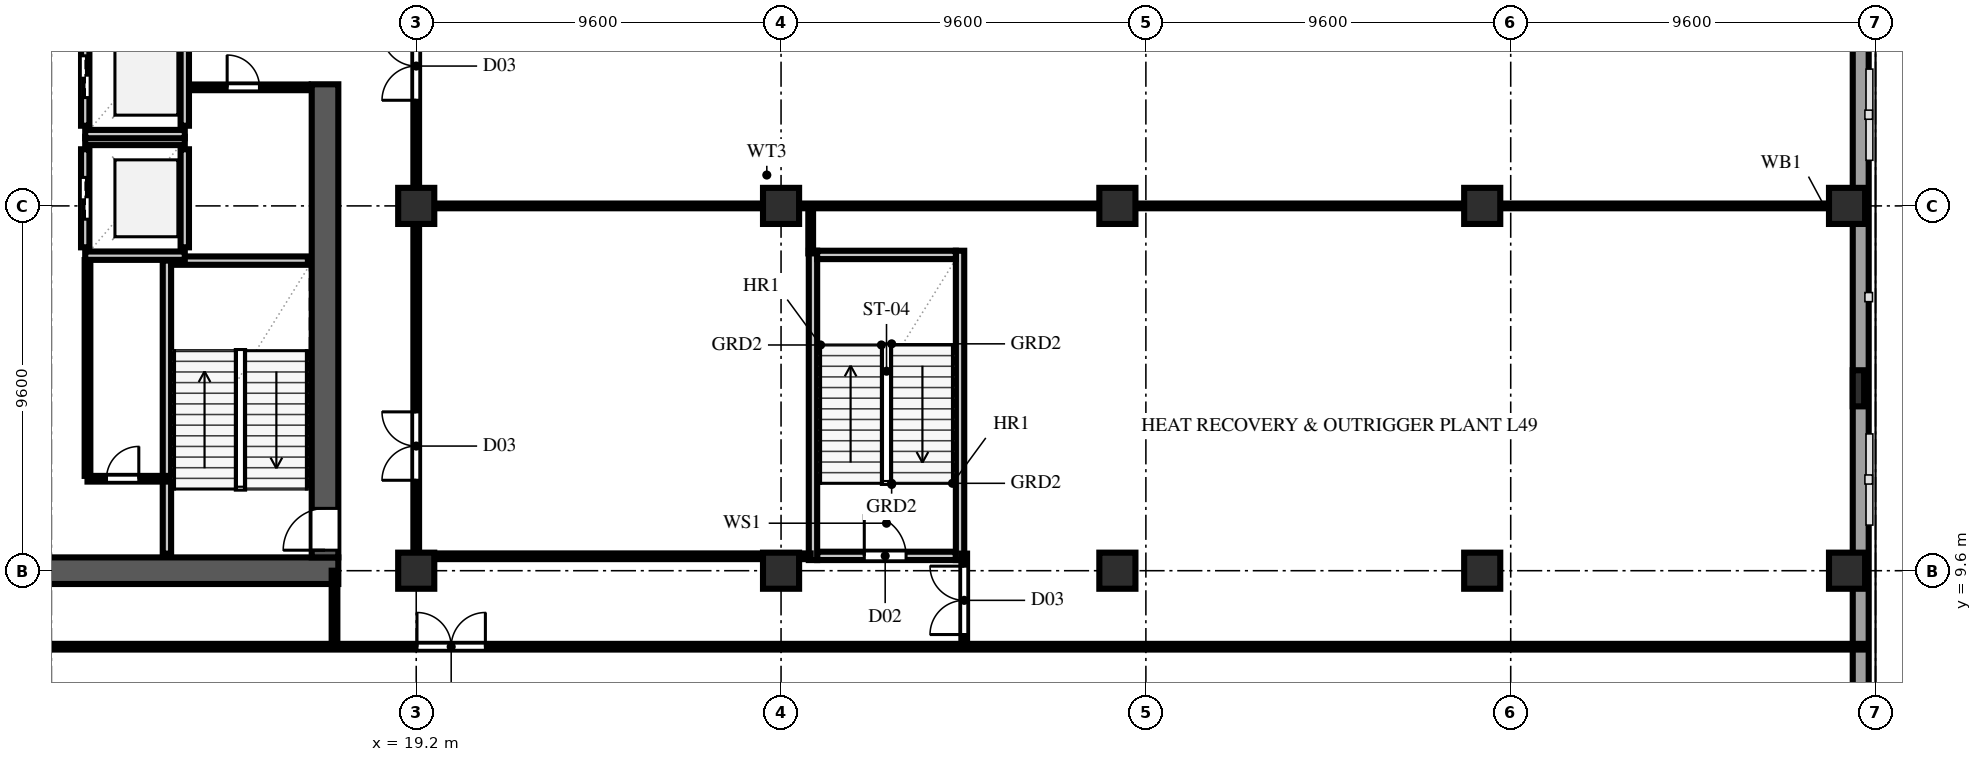
"""IFC4 building model, lengths in metres.
Left out: names, types, materials, properties, quantities, classifications, styles, units other than length and angle.
Written with IfcOpenShell. Run it as: python <this file> out.ifc"""

import sys

from ifc_helpers import new_model, si_unit, direction, frame, frame_2d, origin, origin_2d, place, context, subcontext, project, spatial, rectangle, extrude, element, fill, save


model = new_model("IFC4")
c1 = context("Model", 3, precision=1e-05, world=origin(), true_north=direction((0.0, 1.0)))
c2 = subcontext(c1, "Body", "Model", "MODEL_VIEW")
j1 = project(units=[si_unit("LENGTHUNIT", "METRE"), si_unit("PLANEANGLEUNIT", "RADIAN")], contexts=[c1])
p1 = place(None, origin())
s1 = spatial("IfcSite", under=j1, at=p1, CompositionType="ELEMENT")
p2 = place(p1, origin())
s2 = spatial("IfcBuilding", under=s1, at=p2, CompositionType="ELEMENT")
p3 = place(p2, frame((0.0, 0.0, 194.0)))
s3 = spatial("IfcBuildingStorey", under=s2, at=p3, CompositionType="ELEMENT", Elevation=194.0)
p4 = place(p3, frame((2.55, 9.6, 0.0), z_axis=(0.0, 0.0, 1.0), x_axis=(1.0, 0.0, 0.0)))
e1 = element("IfcWall", 1, at=p4, inside=s3, PredefinedType="SHEAR", context=c2, shape_type="SweptSolid", body=[
    extrude(rectangle(XDim=14.6, YDim=0.7, at=frame_2d((7.3, 0.0))), origin(), (0.0, 0.0, 1.0), 4.74),
])
p5 = place(p3, frame((16.8, 9.95, 0.0), z_axis=(0.0, 0.0, 1.0), x_axis=(0.0, 1.0, 0.0)))
e2 = element("IfcWall", 2, at=p5, inside=s3, PredefinedType="SHEAR", context=c2, shape_type="SweptSolid", body=[
    extrude(rectangle(XDim=12.45, YDim=0.7, at=frame_2d((6.225, 0.0))), origin(), (0.0, 0.0, 1.0), 4.74),
])
p6 = place(p5, frame((0.19, 0.0, 0.0)))
e3 = element("IfcOpeningElement", 3, at=p6, cuts=e2, PredefinedType="OPENING", context=c2, shape_type="SweptSolid", body=[
    extrude(rectangle(XDim=1.1, YDim=2.2, at=frame_2d((0.55, 1.1))), frame((0.0, 0.362, 0.0), z_axis=(0.0, -1.0, 0.0), x_axis=(1.0, 0.0, 0.0)), (0.0, 0.0, 1.0), 0.724),
])
for number, where, z_axis, x_axis in (
    (4, (19.2, 9.6, 0.0), (0.0, 0.0, 1.0), (1.0, 0.0, 0.0)),
    (5, (19.2, 19.2, 0.0), (0.0, 0.0, 1.0), (1.0, 0.0, 0.0)),
    (6, (28.8, 9.6, 0.0), (0.0, 0.0, 1.0), (1.0, 0.0, 0.0)),
    (7, (28.8, 19.2, 0.0), (0.0, 0.0, 1.0), (1.0, 0.0, 0.0)),
    (8, (37.65, 9.6, 0.0), (0.0, 0.0, 1.0), (1.0, 0.0, 0.0)),
    (9, (37.65, 19.2, 0.0), (0.0, 0.0, 1.0), (1.0, 0.0, 0.0)),
    (10, (47.25, 9.6, 0.0), (0.0, 0.0, 1.0), (1.0, 0.0, 0.0)),
    (11, (47.25, 19.2, 0.0), (0.0, 0.0, 1.0), (1.0, 0.0, 0.0)),
    (12, (56.85, 9.6, 0.0), (0.0, 0.0, 1.0), (1.0, 0.0, 0.0)),
    (13, (56.85, 19.2, 0.0), (0.0, 0.0, 1.0), (1.0, 0.0, 0.0)),
):
    element("IfcColumn", number, at=place(p3, frame(where, z_axis=z_axis, x_axis=x_axis)), inside=s3, PredefinedType="COLUMN", context=c2, shape_type="SweptSolid", body=[
        extrude(rectangle(XDim=0.95, YDim=0.95, at=origin_2d()), origin(), (0.0, 0.0, 1.0), 5.0),
    ])
p7 = place(p3, frame((57.15, 14.4, 0.0), z_axis=(0.0, 0.0, 1.0), x_axis=(0.0, 1.0, 0.0)))
e14 = element("IfcColumn", 14, at=p7, inside=s3, PredefinedType="PILASTER", context=c2, shape_type="SweptSolid", body=[
    extrude(rectangle(XDim=0.95, YDim=0.3, at=origin_2d()), origin(), (0.0, 0.0, 1.0), 5.0),
])
p8 = place(p3, frame((57.21, 1.84, 0.0), z_axis=(0.0, 0.0, 1.0), x_axis=(0.0, 1.0, 0.0)))
e15 = element("IfcWall", 15, at=p8, inside=s3, PredefinedType="SOLIDWALL", context=c2, shape_type="SweptSolid", body=[
    extrude(rectangle(XDim=34.72, YDim=0.42, at=frame_2d((17.36, 0.0))), origin(), (0.0, 0.0, 1.0), 4.74),
])
p9 = place(p3, frame((12.64, 10.05, 0.0), z_axis=(0.0, 0.0, 1.0), x_axis=(0.0, 1.0, 0.0)))
e16 = element("IfcWall", 16, at=p9, inside=s3, PredefinedType="SOLIDWALL", context=c2, shape_type="SweptSolid", body=[
    extrude(rectangle(XDim=7.71, YDim=0.22, at=frame_2d((3.855, 0.0))), origin(), (0.0, 0.0, 1.0), 4.74),
])
p10 = place(p3, frame((12.75, 17.76, 0.0), z_axis=(0.0, 0.0, 1.0), x_axis=(1.0, 0.0, 0.0)))
e17 = element("IfcWall", 17, at=p10, inside=s3, PredefinedType="SOLIDWALL", context=c2, shape_type="SweptSolid", body=[
    extrude(rectangle(XDim=3.6, YDim=0.22, at=frame_2d((1.8, 0.0))), origin(), (0.0, 0.0, 1.0), 4.74),
])
p11 = place(p3, frame((29.75, 9.99, 0.0), z_axis=(0.0, 0.0, 1.0), x_axis=(1.0, 0.0, 0.0)))
e18 = element("IfcWall", 18, at=p11, inside=s3, PredefinedType="SOLIDWALL", context=c2, shape_type="SweptSolid", body=[
    extrude(rectangle(XDim=3.65, YDim=0.22, at=frame_2d((1.825, 0.0))), origin(), (0.0, 0.0, 1.0), 4.74),
])
p12 = place(p11, frame((1.24, 0.0, 0.0)))
e19 = element("IfcOpeningElement", 19, at=p12, cuts=e18, PredefinedType="OPENING", context=c2, shape_type="SweptSolid", body=[
    extrude(rectangle(XDim=1.1, YDim=2.2, at=frame_2d((0.55, 1.1))), frame((0.0, 0.122, 0.0), z_axis=(0.0, -1.0, 0.0), x_axis=(1.0, 0.0, 0.0)), (0.0, 0.0, 1.0), 0.244),
])
for number, where, z_axis, x_axis in (
    (20, (29.64, 9.88, 0.0), (0.0, 0.0, 1.0), (0.0, 1.0, 0.0)),
    (21, (33.51, 9.88, 0.0), (0.0, 0.0, 1.0), (0.0, 1.0, 0.0)),
):
    element("IfcWall", number, at=place(p3, frame(where, z_axis=z_axis, x_axis=x_axis)), inside=s3, PredefinedType="SOLIDWALL", context=c2, shape_type="SweptSolid", body=[
        extrude(rectangle(XDim=8.14, YDim=0.22, at=frame_2d((4.07, 0.0))), origin(), (0.0, 0.0, 1.0), 4.74),
    ])
p13 = place(p3, frame((29.75, 17.91, 0.0), z_axis=(0.0, 0.0, 1.0), x_axis=(1.0, 0.0, 0.0)))
e22 = element("IfcWall", 22, at=p13, inside=s3, PredefinedType="SOLIDWALL", context=c2, shape_type="SweptSolid", body=[
    extrude(rectangle(XDim=3.65, YDim=0.22, at=frame_2d((1.825, 0.0))), origin(), (0.0, 0.0, 1.0), 4.74),
])
p14 = place(p3, frame((10.49, 18.11, 0.0), z_axis=(0.0, 0.0, 1.0), x_axis=(0.0, 1.0, 0.0)))
e23 = element("IfcWall", 23, at=p14, inside=s3, PredefinedType="SOLIDWALL", context=c2, shape_type="SweptSolid", body=[
    extrude(rectangle(XDim=2.58, YDim=0.22, at=frame_2d((1.29, 0.0))), origin(), (0.0, 0.0, 1.0), 4.74),
])
p15 = place(p14, frame((0.74, 0.0, 0.0)))
e24 = element("IfcOpeningElement", 24, at=p15, cuts=e23, PredefinedType="OPENING", context=c2, shape_type="SweptSolid", body=[
    extrude(rectangle(XDim=1.1, YDim=2.2, at=frame_2d((0.55, 1.1))), frame((0.0, 0.122, 0.0), z_axis=(0.0, -1.0, 0.0), x_axis=(1.0, 0.0, 0.0)), (0.0, 0.0, 1.0), 0.244),
])
p16 = place(p3, frame((13.11, 18.11, 0.0), z_axis=(0.0, 0.0, 1.0), x_axis=(0.0, 1.0, 0.0)))
e25 = element("IfcWall", 25, at=p16, inside=s3, PredefinedType="SOLIDWALL", context=c2, shape_type="SweptSolid", body=[
    extrude(rectangle(XDim=2.58, YDim=0.22, at=frame_2d((1.29, 0.0))), origin(), (0.0, 0.0, 1.0), 4.74),
])
for number, where, z_axis, x_axis in (
    (26, (10.49, 17.89, 0.0), (0.0, 0.0, 1.0), (1.0, 0.0, 0.0)),
    (27, (10.49, 20.91, 0.0), (0.0, 0.0, 1.0), (1.0, 0.0, 0.0)),
):
    element("IfcWall", number, at=place(p3, frame(where, z_axis=z_axis, x_axis=x_axis)), inside=s3, PredefinedType="SOLIDWALL", context=c2, shape_type="SweptSolid", body=[
        extrude(rectangle(XDim=2.62, YDim=0.22, at=frame_2d((1.31, 0.0))), origin(), (0.0, 0.0, 1.0), 4.74),
    ])
p17 = place(p3, frame((10.49, 21.31, 0.0), z_axis=(0.0, 0.0, 1.0), x_axis=(0.0, 1.0, 0.0)))
e28 = element("IfcWall", 28, at=p17, inside=s3, PredefinedType="SOLIDWALL", context=c2, shape_type="SweptSolid", body=[
    extrude(rectangle(XDim=2.58, YDim=0.22, at=frame_2d((1.29, 0.0))), origin(), (0.0, 0.0, 1.0), 4.74),
])
p18 = place(p17, frame((0.74, 0.0, 0.0)))
e29 = element("IfcOpeningElement", 29, at=p18, cuts=e28, PredefinedType="OPENING", context=c2, shape_type="SweptSolid", body=[
    extrude(rectangle(XDim=1.1, YDim=2.2, at=frame_2d((0.55, 1.1))), frame((0.0, 0.122, 0.0), z_axis=(0.0, -1.0, 0.0), x_axis=(1.0, 0.0, 0.0)), (0.0, 0.0, 1.0), 0.244),
])
p19 = place(p3, frame((13.11, 21.31, 0.0), z_axis=(0.0, 0.0, 1.0), x_axis=(0.0, 1.0, 0.0)))
e30 = element("IfcWall", 30, at=p19, inside=s3, PredefinedType="SOLIDWALL", context=c2, shape_type="SweptSolid", body=[
    extrude(rectangle(XDim=2.58, YDim=0.22, at=frame_2d((1.29, 0.0))), origin(), (0.0, 0.0, 1.0), 4.74),
])
p20 = place(p3, frame((10.49, 21.09, 0.0), z_axis=(0.0, 0.0, 1.0), x_axis=(1.0, 0.0, 0.0)))
e31 = element("IfcWall", 31, at=p20, inside=s3, PredefinedType="SOLIDWALL", context=c2, shape_type="SweptSolid", body=[
    extrude(rectangle(XDim=2.62, YDim=0.22, at=frame_2d((1.31, 0.0))), origin(), (0.0, 0.0, 1.0), 4.74),
])
p21 = place(p3, frame((10.55, 12.02, 0.0), z_axis=(0.0, 0.0, 1.0), x_axis=(1.0, 0.0, 0.0)))
e32 = element("IfcWall", 32, at=p21, inside=s3, PredefinedType="PARTITIONING", context=c2, shape_type="SweptSolid", body=[
    extrude(rectangle(XDim=2.08, YDim=0.15, at=frame_2d((1.04, 0.0))), origin(), (0.0, 0.0, 1.0), 4.74),
])
p22 = place(p21, frame((0.5, 0.0, 0.0)))
e33 = element("IfcOpeningElement", 33, at=p22, cuts=e32, PredefinedType="OPENING", context=c2, shape_type="SweptSolid", body=[
    extrude(rectangle(XDim=0.85, YDim=2.1, at=frame_2d((0.425, 1.05))), frame((0.0, 0.087, 0.0), z_axis=(0.0, -1.0, 0.0), x_axis=(1.0, 0.0, 0.0)), (0.0, 0.0, 1.0), 0.174),
])
p23 = place(p3, frame((10.55, 12.095, 0.0), z_axis=(0.0, 0.0, 1.0), x_axis=(0.0, 1.0, 0.0)))
e34 = element("IfcWall", 34, at=p23, inside=s3, PredefinedType="PARTITIONING", context=c2, shape_type="SweptSolid", body=[
    extrude(rectangle(XDim=5.68, YDim=0.15, at=frame_2d((2.84, 0.0))), origin(), (0.0, 0.0, 1.0), 4.74),
])
p24 = place(p3, frame((13.225, 22.32, 0.0), z_axis=(0.0, 0.0, 1.0), x_axis=(1.0, 0.0, 0.0)))
e35 = element("IfcWall", 35, at=p24, inside=s3, PredefinedType="PARTITIONING", context=c2, shape_type="SweptSolid", body=[
    extrude(rectangle(XDim=3.12, YDim=0.15, at=frame_2d((1.56, 0.0))), origin(), (0.0, 0.0, 1.0), 4.74),
])
p25 = place(p24, frame((1.0, 0.0, 0.0)))
e36 = element("IfcOpeningElement", 36, at=p25, cuts=e35, PredefinedType="OPENING", context=c2, shape_type="SweptSolid", body=[
    extrude(rectangle(XDim=0.85, YDim=2.1, at=frame_2d((0.425, 1.05))), frame((0.0, 0.087, 0.0), z_axis=(0.0, -1.0, 0.0), x_axis=(1.0, 0.0, 0.0)), (0.0, 0.0, 1.0), 0.174),
])
p26 = place(p3, frame((17.05, 7.6, 0.0), z_axis=(0.0, 0.0, 1.0), x_axis=(0.0, 1.0, 0.0)))
e37 = element("IfcWall", 37, at=p26, inside=s3, PredefinedType="PARTITIONING", context=c2, shape_type="SweptSolid", body=[
    extrude(rectangle(XDim=2.0, YDim=0.15, at=frame_2d((1.0, 0.0))), origin(), (0.0, 0.0, 1.0), 4.74),
])
p27 = place(p3, frame((0.22, 7.6, 0.0), z_axis=(0.0, 0.0, 1.0), x_axis=(1.0, 0.0, 0.0)))
e38 = element("IfcWall", 38, at=p27, inside=s3, PredefinedType="PARTITIONING", context=c2, shape_type="SweptSolid", body=[
    extrude(rectangle(XDim=57.16, YDim=0.15, at=frame_2d((28.58, 0.0))), origin(), (0.0, 0.0, 1.0), 4.74),
])
p28 = place(p27, frame((19.0, 0.0, 0.0)))
e39 = element("IfcOpeningElement", 39, at=p28, cuts=e38, PredefinedType="OPENING", context=c2, shape_type="SweptSolid", body=[
    extrude(rectangle(XDim=1.8, YDim=2.2, at=frame_2d((0.9, 1.1))), frame((0.0, 0.087, 0.0), z_axis=(0.0, -1.0, 0.0), x_axis=(1.0, 0.0, 0.0)), (0.0, 0.0, 1.0), 0.174),
])
p29 = place(p3, frame((33.62, 7.6, 0.0), z_axis=(0.0, 0.0, 1.0), x_axis=(0.0, 1.0, 0.0)))
e40 = element("IfcWall", 40, at=p29, inside=s3, PredefinedType="PARTITIONING", context=c2, shape_type="SweptSolid", body=[
    extrude(rectangle(XDim=2.45, YDim=0.15, at=frame_2d((1.225, 0.0))), origin(), (0.0, 0.0, 1.0), 4.74),
])
p30 = place(p29, frame((0.32, 0.0, 0.0)))
e41 = element("IfcOpeningElement", 41, at=p30, cuts=e40, PredefinedType="OPENING", context=c2, shape_type="SweptSolid", body=[
    extrude(rectangle(XDim=1.8, YDim=2.2, at=frame_2d((0.9, 1.1))), frame((0.0, 0.087, 0.0), z_axis=(0.0, -1.0, 0.0), x_axis=(1.0, 0.0, 0.0)), (0.0, 0.0, 1.0), 0.174),
])
p31 = place(p3, frame((19.2, 9.98, 0.0), z_axis=(0.0, 0.0, 1.0), x_axis=(1.0, 0.0, 0.0)))
e42 = element("IfcWall", 42, at=p31, inside=s3, PredefinedType="PARTITIONING", context=c2, shape_type="SweptSolid", body=[
    extrude(rectangle(XDim=10.38, YDim=0.15, at=frame_2d((5.19, 0.0))), origin(), (0.0, 0.0, 1.0), 4.74),
])
p32 = place(p3, frame((29.58, 17.95, 0.0), z_axis=(0.0, 0.0, 1.0), x_axis=(0.0, 1.0, 0.0)))
e43 = element("IfcWall", 43, at=p32, inside=s3, PredefinedType="PARTITIONING", context=c2, shape_type="SweptSolid", body=[
    extrude(rectangle(XDim=1.25, YDim=0.125, at=frame_2d((0.625, 0.0))), origin(), (0.0, 0.0, 1.0), 4.74),
])
p33 = place(p3, frame((19.2, 19.2, 0.0), z_axis=(0.0, 0.0, 1.0), x_axis=(1.0, 0.0, 0.0)))
e44 = element("IfcWall", 44, at=p33, inside=s3, PredefinedType="PARTITIONING", context=c2, shape_type="SweptSolid", body=[
    extrude(rectangle(XDim=18.45, YDim=0.125, at=frame_2d((9.225, 0.0))), origin(), (0.0, 0.0, 1.0), 2.323),
])
p34 = place(p3, frame((37.65, 19.2, 0.0), z_axis=(0.0, 0.0, 1.0), x_axis=(1.0, 0.0, 0.0)))
e45 = element("IfcWall", 45, at=p34, inside=s3, PredefinedType="PARTITIONING", context=c2, shape_type="SweptSolid", body=[
    extrude(rectangle(XDim=19.2, YDim=0.125, at=frame_2d((9.6, 0.0))), origin(), (0.0, 0.0, 1.0), 3.967),
])
p35 = place(p3, frame((56.85, 19.2, 0.0), z_axis=(0.0, 0.0, 1.0), x_axis=(1.0, 0.0, 0.0)))
e46 = element("IfcWall", 46, at=p35, inside=s3, PredefinedType="PARTITIONING", context=c2, shape_type="SweptSolid", body=[
    extrude(rectangle(XDim=0.53, YDim=0.125, at=frame_2d((0.265, 0.0))), origin(), (0.0, 0.0, 1.0), 4.74),
])
p36 = place(p3, frame((19.2, 9.98, 0.0), z_axis=(0.0, 0.0, 1.0), x_axis=(0.0, 1.0, 0.0)))
e47 = element("IfcWall", 47, at=p36, inside=s3, PredefinedType="PARTITIONING", context=c2, shape_type="SweptSolid", body=[
    extrude(rectangle(XDim=46.87, YDim=0.15, at=frame_2d((23.435, 0.0))), origin(), (0.0, 0.0, 1.0), 3.967),
])
p37 = place(p36, frame((2.0, 0.0, 0.0)))
e48 = element("IfcOpeningElement", 48, at=p37, cuts=e47, PredefinedType="OPENING", context=c2, shape_type="SweptSolid", body=[
    extrude(rectangle(XDim=1.8, YDim=2.2, at=frame_2d((0.9, 1.1))), frame((0.0, 0.087, 0.0), z_axis=(0.0, -1.0, 0.0), x_axis=(1.0, 0.0, 0.0)), (0.0, 0.0, 1.0), 0.174),
])
p38 = place(p36, frame((12.0, 0.0, 0.0)))
e49 = element("IfcOpeningElement", 49, at=p38, cuts=e47, PredefinedType="OPENING", context=c2, shape_type="SweptSolid", body=[
    extrude(rectangle(XDim=1.8, YDim=2.2, at=frame_2d((0.9, 1.1))), frame((0.0, 0.087, 0.0), z_axis=(0.0, -1.0, 0.0), x_axis=(1.0, 0.0, 0.0)), (0.0, 0.0, 1.0), 0.174),
])
p39 = place(p36, frame((30.5, 0.0, 0.0)))
e50 = element("IfcOpeningElement", 50, at=p39, cuts=e47, PredefinedType="OPENING", context=c2, shape_type="SweptSolid", body=[
    extrude(rectangle(XDim=1.2, YDim=2.2, at=frame_2d((0.6, 1.1))), frame((0.0, 0.087, 0.0), z_axis=(0.0, -1.0, 0.0), x_axis=(1.0, 0.0, 0.0)), (0.0, 0.0, 1.0), 0.174),
])
p40 = place(p36, frame((40.5, 0.0, 0.0)))
e51 = element("IfcOpeningElement", 51, at=p40, cuts=e47, PredefinedType="OPENING", context=c2, shape_type="SweptSolid", body=[
    extrude(rectangle(XDim=1.8, YDim=2.2, at=frame_2d((0.9, 1.1))), frame((0.0, 0.087, 0.0), z_axis=(0.0, -1.0, 0.0), x_axis=(1.0, 0.0, 0.0)), (0.0, 0.0, 1.0), 0.174),
])
p41 = place(p6, origin())
e52 = element("IfcDoor", 52, at=p41, inside=s3, OperationType="SINGLE_SWING_LEFT", PredefinedType="DOOR", context=c2, shape_type="SweptSolid", body=[
    extrude(rectangle(XDim=1.1, YDim=2.2, at=frame_2d((0.55, 1.1))), frame((0.0, 0.025, 0.0), z_axis=(0.0, -1.0, 0.0), x_axis=(1.0, 0.0, 0.0)), (0.0, 0.0, 1.0), 0.05),
])
fill(e3, e52)
p42 = place(p12, origin())
e53 = element("IfcDoor", 53, at=p42, inside=s3, OperationType="SINGLE_SWING_LEFT", PredefinedType="DOOR", context=c2, shape_type="SweptSolid", body=[
    extrude(rectangle(XDim=1.1, YDim=2.2, at=frame_2d((0.55, 1.1))), frame((0.0, 0.025, 0.0), z_axis=(0.0, -1.0, 0.0), x_axis=(1.0, 0.0, 0.0)), (0.0, 0.0, 1.0), 0.05),
])
fill(e19, e53)
p43 = place(p15, origin())
e54 = element("IfcDoor", 54, at=p43, inside=s3, OperationType="DOUBLE_DOOR_SLIDING", PredefinedType="DOOR", context=c2, shape_type="SweptSolid", body=[
    extrude(rectangle(XDim=1.1, YDim=2.2, at=frame_2d((0.55, 1.1))), frame((0.0, 0.025, 0.0), z_axis=(0.0, -1.0, 0.0), x_axis=(1.0, 0.0, 0.0)), (0.0, 0.0, 1.0), 0.05),
])
fill(e24, e54)
p44 = place(p18, origin())
e55 = element("IfcDoor", 55, at=p44, inside=s3, OperationType="DOUBLE_DOOR_SLIDING", PredefinedType="DOOR", context=c2, shape_type="SweptSolid", body=[
    extrude(rectangle(XDim=1.1, YDim=2.2, at=frame_2d((0.55, 1.1))), frame((0.0, 0.025, 0.0), z_axis=(0.0, -1.0, 0.0), x_axis=(1.0, 0.0, 0.0)), (0.0, 0.0, 1.0), 0.05),
])
fill(e29, e55)
p45 = place(p22, origin())
e56 = element("IfcDoor", 56, at=p45, inside=s3, OperationType="SINGLE_SWING_RIGHT", PredefinedType="DOOR", context=c2, shape_type="SweptSolid", body=[
    extrude(rectangle(XDim=0.85, YDim=2.1, at=frame_2d((0.425, 1.05))), frame((0.0, 0.025, 0.0), z_axis=(0.0, -1.0, 0.0), x_axis=(1.0, 0.0, 0.0)), (0.0, 0.0, 1.0), 0.05),
])
fill(e33, e56)
p46 = place(p25, origin())
e57 = element("IfcDoor", 57, at=p46, inside=s3, OperationType="SINGLE_SWING_LEFT", PredefinedType="DOOR", context=c2, shape_type="SweptSolid", body=[
    extrude(rectangle(XDim=0.85, YDim=2.1, at=frame_2d((0.425, 1.05))), frame((0.0, 0.025, 0.0), z_axis=(0.0, -1.0, 0.0), x_axis=(1.0, 0.0, 0.0)), (0.0, 0.0, 1.0), 0.05),
])
fill(e36, e57)
p47 = place(p28, origin())
e58 = element("IfcDoor", 58, at=p47, inside=s3, OperationType="DOUBLE_DOOR_SINGLE_SWING", PredefinedType="DOOR", context=c2, shape_type="SweptSolid", body=[
    extrude(rectangle(XDim=1.8, YDim=2.2, at=frame_2d((0.9, 1.1))), frame((0.0, 0.025, 0.0), z_axis=(0.0, -1.0, 0.0), x_axis=(1.0, 0.0, 0.0)), (0.0, 0.0, 1.0), 0.05),
])
fill(e39, e58)
p48 = place(p30, origin())
e59 = element("IfcDoor", 59, at=p48, inside=s3, OperationType="DOUBLE_DOOR_SINGLE_SWING", PredefinedType="DOOR", context=c2, shape_type="SweptSolid", body=[
    extrude(rectangle(XDim=1.8, YDim=2.2, at=frame_2d((0.9, 1.1))), frame((0.0, 0.025, 0.0), z_axis=(0.0, -1.0, 0.0), x_axis=(1.0, 0.0, 0.0)), (0.0, 0.0, 1.0), 0.05),
])
fill(e41, e59)
p49 = place(p37, origin())
e60 = element("IfcDoor", 60, at=p49, inside=s3, OperationType="DOUBLE_DOOR_SINGLE_SWING", PredefinedType="DOOR", context=c2, shape_type="SweptSolid", body=[
    extrude(rectangle(XDim=1.8, YDim=2.2, at=frame_2d((0.9, 1.1))), frame((0.0, 0.025, 0.0), z_axis=(0.0, -1.0, 0.0), x_axis=(1.0, 0.0, 0.0)), (0.0, 0.0, 1.0), 0.05),
])
fill(e48, e60)
p50 = place(p38, origin())
e61 = element("IfcDoor", 61, at=p50, inside=s3, OperationType="DOUBLE_DOOR_SINGLE_SWING", PredefinedType="DOOR", context=c2, shape_type="SweptSolid", body=[
    extrude(rectangle(XDim=1.8, YDim=2.2, at=frame_2d((0.9, 1.1))), frame((0.0, 0.025, 0.0), z_axis=(0.0, -1.0, 0.0), x_axis=(1.0, 0.0, 0.0)), (0.0, 0.0, 1.0), 0.05),
])
fill(e49, e61)
save(model, sys.argv[1])
